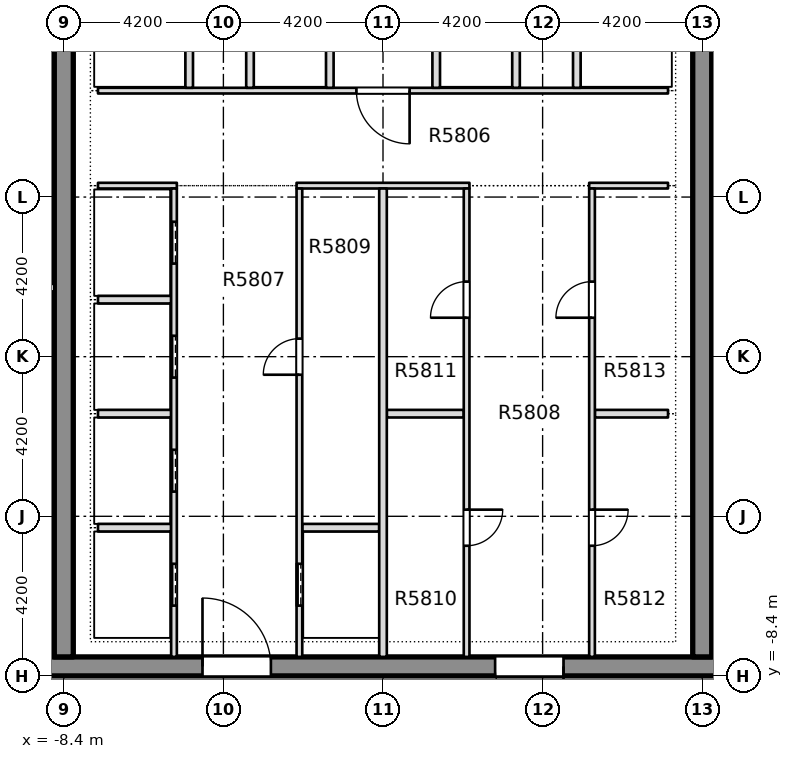
"""IFC4 building model, lengths in metres.
Left out: names, types, materials, properties, quantities, classifications, styles, units other than length and angle.
Written with IfcOpenShell. Run it as: python <this file> out.ifc"""

import sys

from ifc_helpers import new_model, si_unit, direction, frame, frame_2d, origin, place, context, subcontext, project, spatial, rectangle, extrude, element, fill, save


model = new_model("IFC4")
c1 = context("Model", 3, precision=1e-05, world=origin(), true_north=direction((0.0, 1.0)))
c2 = subcontext(c1, "Body", "Model", "MODEL_VIEW")
j1 = project(units=[si_unit("LENGTHUNIT", "METRE"), si_unit("PLANEANGLEUNIT", "RADIAN")], contexts=[c1])
p1 = place(None, origin())
s1 = spatial("IfcSite", under=j1, at=p1, CompositionType="ELEMENT")
p2 = place(p1, origin())
s2 = spatial("IfcBuilding", under=s1, at=p2, CompositionType="ELEMENT")
p3 = place(p2, frame((0.0, 0.0, 223.45)))
s3 = spatial("IfcBuildingStorey", under=s2, at=p3, CompositionType="ELEMENT", Elevation=223.45)
p4 = place(p3, frame((-12.1, -8.15, -0.4), z_axis=(0.0, 0.0, 1.0), x_axis=(1.0, 0.0, 0.0)))
e1 = element("IfcWall", 1, at=p4, inside=s3, PredefinedType="SHEAR", context=c2, shape_type="SweptSolid", body=[
    extrude(rectangle(XDim=24.2, YDim=0.5, at=frame_2d((12.1, 0.0))), origin(), (0.0, 0.0, 1.0), 3.45),
])
p5 = place(p4, frame((7.35, 0.0, 0.4)))
e2 = element("IfcOpeningElement", 2, at=p5, cuts=e1, PredefinedType="OPENING", context=c2, shape_type="SweptSolid", body=[
    extrude(rectangle(XDim=1.8, YDim=2.1, at=frame_2d((0.9, 1.05))), frame((0.0, 0.26, 0.0), z_axis=(0.0, -1.0, 0.0), x_axis=(1.0, 0.0, 0.0)), (0.0, 0.0, 1.0), 0.52),
])
p6 = place(p4, frame((15.05, 0.0, 0.4)))
e3 = element("IfcOpeningElement", 3, at=p6, cuts=e1, PredefinedType="OPENING", context=c2, shape_type="SweptSolid", body=[
    extrude(rectangle(XDim=1.8, YDim=2.1, at=frame_2d((0.9, 1.05))), frame((0.0, 0.26, 0.0), z_axis=(0.0, -1.0, 0.0), x_axis=(1.0, 0.0, 0.0)), (0.0, 0.0, 1.0), 0.52),
])
p7 = place(p3, frame((-8.4, -7.9, -0.4), z_axis=(0.0, 0.0, 1.0), x_axis=(0.0, 1.0, 0.0)))
e4 = element("IfcWall", 4, at=p7, inside=s3, PredefinedType="SHEAR", context=c2, shape_type="SweptSolid", body=[
    extrude(rectangle(XDim=29.15, YDim=0.5, at=frame_2d((14.575, 0.0))), origin(), (0.0, 0.0, 1.0), 3.45),
])
p8 = place(p7, frame((18.8, 0.0, 0.4)))
e5 = element("IfcOpeningElement", 5, at=p8, cuts=e4, PredefinedType="OPENING", context=c2, shape_type="SweptSolid", body=[
    extrude(rectangle(XDim=1.2, YDim=2.1, at=frame_2d((0.6, 1.05))), frame((0.0, 0.26, 0.0), z_axis=(0.0, -1.0, 0.0), x_axis=(1.0, 0.0, 0.0)), (0.0, 0.0, 1.0), 0.52),
])
p9 = place(p3, frame((8.4, -7.9, -0.4), z_axis=(0.0, 0.0, 1.0), x_axis=(0.0, 1.0, 0.0)))
e6 = element("IfcWall", 6, at=p9, inside=s3, PredefinedType="SHEAR", context=c2, shape_type="SweptSolid", body=[
    extrude(rectangle(XDim=29.15, YDim=0.5, at=frame_2d((14.575, 0.0))), origin(), (0.0, 0.0, 1.0), 3.45),
])
p10 = place(p9, frame((18.8, 0.0, 0.4)))
e7 = element("IfcOpeningElement", 7, at=p10, cuts=e6, PredefinedType="OPENING", context=c2, shape_type="SweptSolid", body=[
    extrude(rectangle(XDim=1.2, YDim=2.1, at=frame_2d((0.6, 1.05))), frame((0.0, 0.26, 0.0), z_axis=(0.0, -1.0, 0.0), x_axis=(1.0, 0.0, 0.0)), (0.0, 0.0, 1.0), 0.52),
])
p11 = place(p3, frame((-7.5, -4.5, 0.0), z_axis=(0.0, 0.0, 1.0), x_axis=(1.0, 0.0, 0.0)))
e8 = element("IfcWall", 8, at=p11, inside=s3, PredefinedType="PARTITIONING", context=c2, shape_type="SweptSolid", body=[
    extrude(rectangle(XDim=1.925, YDim=0.2, at=frame_2d((0.962, 0.0))), origin(), (0.0, 0.0, 1.0), 3.05),
])
p12 = place(p3, frame((-2.125, -4.5, 0.0), z_axis=(0.0, 0.0, 1.0), x_axis=(1.0, 0.0, 0.0)))
e9 = element("IfcWall", 9, at=p12, inside=s3, PredefinedType="PARTITIONING", context=c2, shape_type="SweptSolid", body=[
    extrude(rectangle(XDim=2.025, YDim=0.2, at=frame_2d((1.012, 0.0))), origin(), (0.0, 0.0, 1.0), 3.05),
])
p13 = place(p3, frame((-7.5, -1.5, 0.0), z_axis=(0.0, 0.0, 1.0), x_axis=(1.0, 0.0, 0.0)))
e10 = element("IfcWall", 10, at=p13, inside=s3, PredefinedType="PARTITIONING", context=c2, shape_type="SweptSolid", body=[
    extrude(rectangle(XDim=1.925, YDim=0.2, at=frame_2d((0.962, 0.0))), origin(), (0.0, 0.0, 1.0), 3.05),
])
p14 = place(p3, frame((0.1, -1.5, 0.0), z_axis=(0.0, 0.0, 1.0), x_axis=(1.0, 0.0, 0.0)))
e11 = element("IfcWall", 11, at=p14, inside=s3, PredefinedType="PARTITIONING", context=c2, shape_type="SweptSolid", body=[
    extrude(rectangle(XDim=2.025, YDim=0.2, at=frame_2d((1.012, 0.0))), origin(), (0.0, 0.0, 1.0), 3.05),
])
for number, where, z_axis, x_axis in (
    (12, (5.575, -1.5, 0.0), (0.0, 0.0, 1.0), (1.0, 0.0, 0.0)),
    (13, (-7.5, 1.5, 0.0), (0.0, 0.0, 1.0), (1.0, 0.0, 0.0)),
):
    element("IfcWall", number, at=place(p3, frame(where, z_axis=z_axis, x_axis=x_axis)), inside=s3, PredefinedType="PARTITIONING", context=c2, shape_type="SweptSolid", body=[
        extrude(rectangle(XDim=1.925, YDim=0.2, at=frame_2d((0.962, 0.0))), origin(), (0.0, 0.0, 1.0), 3.05),
    ])
p15 = place(p3, frame((-7.5, 4.5, 0.0), z_axis=(0.0, 0.0, 1.0), x_axis=(1.0, 0.0, 0.0)))
e14 = element("IfcWall", 14, at=p15, inside=s3, PredefinedType="PARTITIONING", context=c2, shape_type="SweptSolid", body=[
    extrude(rectangle(XDim=2.075, YDim=0.15, at=frame_2d((1.038, 0.0))), origin(), (0.0, 0.0, 1.0), 3.05),
])
p16 = place(p3, frame((-2.275, 4.5, 0.0), z_axis=(0.0, 0.0, 1.0), x_axis=(1.0, 0.0, 0.0)))
e15 = element("IfcWall", 15, at=p16, inside=s3, PredefinedType="PARTITIONING", context=c2, shape_type="SweptSolid", body=[
    extrude(rectangle(XDim=4.55, YDim=0.15, at=frame_2d((2.275, 0.0))), origin(), (0.0, 0.0, 1.0), 3.05),
])
p17 = place(p3, frame((5.425, 4.5, 0.0), z_axis=(0.0, 0.0, 1.0), x_axis=(1.0, 0.0, 0.0)))
e16 = element("IfcWall", 16, at=p17, inside=s3, PredefinedType="PARTITIONING", context=c2, shape_type="SweptSolid", body=[
    extrude(rectangle(XDim=2.075, YDim=0.15, at=frame_2d((1.038, 0.0))), origin(), (0.0, 0.0, 1.0), 3.05),
])
p18 = place(p3, frame((-7.5, 7.0, 0.0), z_axis=(0.0, 0.0, 1.0), x_axis=(1.0, 0.0, 0.0)))
e17 = element("IfcWall", 17, at=p18, inside=s3, PredefinedType="PARTITIONING", context=c2, shape_type="SweptSolid", body=[
    extrude(rectangle(XDim=15.0, YDim=0.15, at=frame_2d((7.5, 0.0))), origin(), (0.0, 0.0, 1.0), 3.05),
])
p19 = place(p18, frame((6.8, 0.0, 0.0)))
e18 = element("IfcOpeningElement", 18, at=p19, cuts=e17, PredefinedType="OPENING", context=c2, shape_type="SweptSolid", body=[
    extrude(rectangle(XDim=1.4, YDim=2.1, at=frame_2d((0.7, 1.05))), frame((0.0, 0.085, 0.0), z_axis=(0.0, -1.0, 0.0), x_axis=(1.0, 0.0, 0.0)), (0.0, 0.0, 1.0), 0.17),
])
p20 = place(p3, frame((-5.5, -7.899, 0.0), z_axis=(0.0, 0.0, 1.0), x_axis=(0.0, 1.0, 0.0)))
e19 = element("IfcWall", 19, at=p20, inside=s3, PredefinedType="PARTITIONING", context=c2, shape_type="SweptSolid", body=[
    extrude(rectangle(XDim=12.324, YDim=0.15, at=frame_2d((6.162, 0.0))), origin(), (0.0, 0.0, 1.0), 3.05),
])
p21 = place(p20, frame((1.349, 0.0, 0.0)))
e20 = element("IfcOpeningElement", 20, at=p21, cuts=e19, PredefinedType="OPENING", context=c2, shape_type="SweptSolid", body=[
    extrude(rectangle(XDim=1.1, YDim=2.1, at=frame_2d((0.55, 1.05))), frame((0.0, 0.085, 0.0), z_axis=(0.0, -1.0, 0.0), x_axis=(1.0, 0.0, 0.0)), (0.0, 0.0, 1.0), 0.17),
])
p22 = place(p20, frame((4.349, 0.0, 0.0)))
e21 = element("IfcOpeningElement", 21, at=p22, cuts=e19, PredefinedType="OPENING", context=c2, shape_type="SweptSolid", body=[
    extrude(rectangle(XDim=1.1, YDim=2.1, at=frame_2d((0.55, 1.05))), frame((0.0, 0.085, 0.0), z_axis=(0.0, -1.0, 0.0), x_axis=(1.0, 0.0, 0.0)), (0.0, 0.0, 1.0), 0.17),
])
p23 = place(p20, frame((7.349, 0.0, 0.0)))
e22 = element("IfcOpeningElement", 22, at=p23, cuts=e19, PredefinedType="OPENING", context=c2, shape_type="SweptSolid", body=[
    extrude(rectangle(XDim=1.1, YDim=2.1, at=frame_2d((0.55, 1.05))), frame((0.0, 0.085, 0.0), z_axis=(0.0, -1.0, 0.0), x_axis=(1.0, 0.0, 0.0)), (0.0, 0.0, 1.0), 0.17),
])
p24 = place(p20, frame((10.349, 0.0, 0.0)))
e23 = element("IfcOpeningElement", 23, at=p24, cuts=e19, PredefinedType="OPENING", context=c2, shape_type="SweptSolid", body=[
    extrude(rectangle(XDim=1.1, YDim=2.1, at=frame_2d((0.55, 1.05))), frame((0.0, 0.085, 0.0), z_axis=(0.0, -1.0, 0.0), x_axis=(1.0, 0.0, 0.0)), (0.0, 0.0, 1.0), 0.17),
])
p25 = place(p3, frame((-5.1, 7.075, 0.0), z_axis=(0.0, 0.0, 1.0), x_axis=(0.0, 1.0, 0.0)))
e24 = element("IfcWall", 24, at=p25, inside=s3, PredefinedType="PARTITIONING", context=c2, shape_type="SweptSolid", body=[
    extrude(rectangle(XDim=2.725, YDim=0.2, at=frame_2d((1.363, 0.0))), origin(), (0.0, 0.0, 1.0), 3.05),
])
p26 = place(p3, frame((-3.5, 7.075, 0.0), z_axis=(0.0, 0.0, 1.0), x_axis=(0.0, 1.0, 0.0)))
e25 = element("IfcWall", 25, at=p26, inside=s3, PredefinedType="PARTITIONING", context=c2, shape_type="SweptSolid", body=[
    extrude(rectangle(XDim=2.85, YDim=0.2, at=frame_2d((1.425, 0.0))), origin(), (0.0, 0.0, 1.0), 3.05),
])
p27 = place(p3, frame((-2.2, -7.899, 0.0), z_axis=(0.0, 0.0, 1.0), x_axis=(0.0, 1.0, 0.0)))
e26 = element("IfcWall", 26, at=p27, inside=s3, PredefinedType="PARTITIONING", context=c2, shape_type="SweptSolid", body=[
    extrude(rectangle(XDim=12.324, YDim=0.15, at=frame_2d((6.162, 0.0))), origin(), (0.0, 0.0, 1.0), 3.05),
])
p28 = place(p27, frame((1.349, 0.0, 0.0)))
e27 = element("IfcOpeningElement", 27, at=p28, cuts=e26, PredefinedType="OPENING", context=c2, shape_type="SweptSolid", body=[
    extrude(rectangle(XDim=1.1, YDim=2.1, at=frame_2d((0.55, 1.05))), frame((0.0, 0.085, 0.0), z_axis=(0.0, -1.0, 0.0), x_axis=(1.0, 0.0, 0.0)), (0.0, 0.0, 1.0), 0.17),
])
p29 = place(p27, frame((7.424, 0.0, 0.0)))
e28 = element("IfcOpeningElement", 28, at=p29, cuts=e26, PredefinedType="OPENING", context=c2, shape_type="SweptSolid", body=[
    extrude(rectangle(XDim=0.95, YDim=2.1, at=frame_2d((0.475, 1.05))), frame((0.0, 0.085, 0.0), z_axis=(0.0, -1.0, 0.0), x_axis=(1.0, 0.0, 0.0)), (0.0, 0.0, 1.0), 0.17),
])
p30 = place(p3, frame((-1.4, 7.075, 0.0), z_axis=(0.0, 0.0, 1.0), x_axis=(0.0, 1.0, 0.0)))
e29 = element("IfcWall", 29, at=p30, inside=s3, PredefinedType="PARTITIONING", context=c2, shape_type="SweptSolid", body=[
    extrude(rectangle(XDim=2.85, YDim=0.2, at=frame_2d((1.425, 0.0))), origin(), (0.0, 0.0, 1.0), 3.05),
])
p31 = place(p3, frame((0.0, -7.899, 0.0), z_axis=(0.0, 0.0, 1.0), x_axis=(0.0, 1.0, 0.0)))
e30 = element("IfcWall", 30, at=p31, inside=s3, PredefinedType="PARTITIONING", context=c2, shape_type="SweptSolid", body=[
    extrude(rectangle(XDim=12.324, YDim=0.2, at=frame_2d((6.162, 0.0))), origin(), (0.0, 0.0, 1.0), 3.05),
])
p32 = place(p3, frame((1.4, 7.075, 0.0), z_axis=(0.0, 0.0, 1.0), x_axis=(0.0, 1.0, 0.0)))
e31 = element("IfcWall", 31, at=p32, inside=s3, PredefinedType="PARTITIONING", context=c2, shape_type="SweptSolid", body=[
    extrude(rectangle(XDim=2.85, YDim=0.2, at=frame_2d((1.425, 0.0))), origin(), (0.0, 0.0, 1.0), 3.05),
])
p33 = place(p3, frame((2.2, -7.899, 0.0), z_axis=(0.0, 0.0, 1.0), x_axis=(0.0, 1.0, 0.0)))
e32 = element("IfcWall", 32, at=p33, inside=s3, PredefinedType="PARTITIONING", context=c2, shape_type="SweptSolid", body=[
    extrude(rectangle(XDim=12.324, YDim=0.15, at=frame_2d((6.162, 0.0))), origin(), (0.0, 0.0, 1.0), 3.05),
])
p34 = place(p33, frame((2.924, 0.0, 0.0)))
e33 = element("IfcOpeningElement", 33, at=p34, cuts=e32, PredefinedType="OPENING", context=c2, shape_type="SweptSolid", body=[
    extrude(rectangle(XDim=0.95, YDim=2.1, at=frame_2d((0.475, 1.05))), frame((0.0, 0.085, 0.0), z_axis=(0.0, -1.0, 0.0), x_axis=(1.0, 0.0, 0.0)), (0.0, 0.0, 1.0), 0.17),
])
p35 = place(p33, frame((8.924, 0.0, 0.0)))
e34 = element("IfcOpeningElement", 34, at=p35, cuts=e32, PredefinedType="OPENING", context=c2, shape_type="SweptSolid", body=[
    extrude(rectangle(XDim=0.95, YDim=2.1, at=frame_2d((0.475, 1.05))), frame((0.0, 0.085, 0.0), z_axis=(0.0, -1.0, 0.0), x_axis=(1.0, 0.0, 0.0)), (0.0, 0.0, 1.0), 0.17),
])
p36 = place(p3, frame((3.5, 7.075, 0.0), z_axis=(0.0, 0.0, 1.0), x_axis=(0.0, 1.0, 0.0)))
e35 = element("IfcWall", 35, at=p36, inside=s3, PredefinedType="PARTITIONING", context=c2, shape_type="SweptSolid", body=[
    extrude(rectangle(XDim=2.85, YDim=0.2, at=frame_2d((1.425, 0.0))), origin(), (0.0, 0.0, 1.0), 3.05),
])
p37 = place(p3, frame((5.1, 7.075, 0.0), z_axis=(0.0, 0.0, 1.0), x_axis=(0.0, 1.0, 0.0)))
e36 = element("IfcWall", 36, at=p37, inside=s3, PredefinedType="PARTITIONING", context=c2, shape_type="SweptSolid", body=[
    extrude(rectangle(XDim=2.725, YDim=0.2, at=frame_2d((1.363, 0.0))), origin(), (0.0, 0.0, 1.0), 3.05),
])
p38 = place(p3, frame((5.5, -7.899, 0.0), z_axis=(0.0, 0.0, 1.0), x_axis=(0.0, 1.0, 0.0)))
e37 = element("IfcWall", 37, at=p38, inside=s3, PredefinedType="PARTITIONING", context=c2, shape_type="SweptSolid", body=[
    extrude(rectangle(XDim=12.324, YDim=0.15, at=frame_2d((6.162, 0.0))), origin(), (0.0, 0.0, 1.0), 3.05),
])
p39 = place(p38, frame((2.924, 0.0, 0.0)))
e38 = element("IfcOpeningElement", 38, at=p39, cuts=e37, PredefinedType="OPENING", context=c2, shape_type="SweptSolid", body=[
    extrude(rectangle(XDim=0.95, YDim=2.1, at=frame_2d((0.475, 1.05))), frame((0.0, 0.085, 0.0), z_axis=(0.0, -1.0, 0.0), x_axis=(1.0, 0.0, 0.0)), (0.0, 0.0, 1.0), 0.17),
])
p40 = place(p38, frame((8.924, 0.0, 0.0)))
e39 = element("IfcOpeningElement", 39, at=p40, cuts=e37, PredefinedType="OPENING", context=c2, shape_type="SweptSolid", body=[
    extrude(rectangle(XDim=0.95, YDim=2.1, at=frame_2d((0.475, 1.05))), frame((0.0, 0.085, 0.0), z_axis=(0.0, -1.0, 0.0), x_axis=(1.0, 0.0, 0.0)), (0.0, 0.0, 1.0), 0.17),
])
p41 = place(p3, frame((-12.099, 1.816, 0.0), z_axis=(0.0, 0.0, 1.0), x_axis=(1.0, 0.0, 0.0)))
e40 = element("IfcWall", 40, at=p41, inside=s3, PredefinedType="PARTITIONING", context=c2, shape_type="SweptSolid", body=[
    extrude(rectangle(XDim=3.448, YDim=0.2, at=frame_2d((1.724, 0.0))), origin(), (0.0, 0.0, 1.0), 3.05),
])
for number, where, z_axis, x_axis in (
    (41, (8.651, -0.125, 0.0), (0.0, 0.0, 1.0), (1.0, 0.0, 0.0)),
    (42, (8.651, 4.054, 0.0), (0.0, 0.0, 1.0), (1.0, 0.0, 0.0)),
):
    element("IfcWall", number, at=place(p3, frame(where, z_axis=z_axis, x_axis=x_axis)), inside=s3, PredefinedType="PARTITIONING", context=c2, shape_type="SweptSolid", body=[
        extrude(rectangle(XDim=3.448, YDim=0.1, at=frame_2d((1.724, 0.0))), origin(), (0.0, 0.0, 1.0), 3.05),
    ])
p42 = place(p21, origin())
e43 = element("IfcDoor", 43, at=p42, inside=s3, OperationType="SLIDING_TO_LEFT", PredefinedType="DOOR", context=c2, shape_type="SweptSolid", body=[
    extrude(rectangle(XDim=1.1, YDim=2.1, at=frame_2d((0.55, 1.05))), frame((0.0, 0.025, 0.0), z_axis=(0.0, -1.0, 0.0), x_axis=(1.0, 0.0, 0.0)), (0.0, 0.0, 1.0), 0.05),
])
fill(e20, e43)
p43 = place(p22, origin())
e44 = element("IfcDoor", 44, at=p43, inside=s3, OperationType="SLIDING_TO_LEFT", PredefinedType="DOOR", context=c2, shape_type="SweptSolid", body=[
    extrude(rectangle(XDim=1.1, YDim=2.1, at=frame_2d((0.55, 1.05))), frame((0.0, 0.025, 0.0), z_axis=(0.0, -1.0, 0.0), x_axis=(1.0, 0.0, 0.0)), (0.0, 0.0, 1.0), 0.05),
])
fill(e21, e44)
p44 = place(p23, origin())
e45 = element("IfcDoor", 45, at=p44, inside=s3, OperationType="SLIDING_TO_LEFT", PredefinedType="DOOR", context=c2, shape_type="SweptSolid", body=[
    extrude(rectangle(XDim=1.1, YDim=2.1, at=frame_2d((0.55, 1.05))), frame((0.0, 0.025, 0.0), z_axis=(0.0, -1.0, 0.0), x_axis=(1.0, 0.0, 0.0)), (0.0, 0.0, 1.0), 0.05),
])
fill(e22, e45)
p45 = place(p24, origin())
e46 = element("IfcDoor", 46, at=p45, inside=s3, OperationType="SLIDING_TO_LEFT", PredefinedType="DOOR", context=c2, shape_type="SweptSolid", body=[
    extrude(rectangle(XDim=1.1, YDim=2.1, at=frame_2d((0.55, 1.05))), frame((0.0, 0.025, 0.0), z_axis=(0.0, -1.0, 0.0), x_axis=(1.0, 0.0, 0.0)), (0.0, 0.0, 1.0), 0.05),
])
fill(e23, e46)
p46 = place(p28, origin())
e47 = element("IfcDoor", 47, at=p46, inside=s3, OperationType="SLIDING_TO_LEFT", PredefinedType="DOOR", context=c2, shape_type="SweptSolid", body=[
    extrude(rectangle(XDim=1.1, YDim=2.1, at=frame_2d((0.55, 1.05))), frame((0.0, 0.025, 0.0), z_axis=(0.0, -1.0, 0.0), x_axis=(1.0, 0.0, 0.0)), (0.0, 0.0, 1.0), 0.05),
])
fill(e27, e47)
p47 = place(p29, origin())
e48 = element("IfcDoor", 48, at=p47, inside=s3, OperationType="SINGLE_SWING_RIGHT", PredefinedType="DOOR", context=c2, shape_type="SweptSolid", body=[
    extrude(rectangle(XDim=0.95, YDim=2.1, at=frame_2d((0.475, 1.05))), frame((0.0, 0.025, 0.0), z_axis=(0.0, -1.0, 0.0), x_axis=(1.0, 0.0, 0.0)), (0.0, 0.0, 1.0), 0.05),
])
fill(e28, e48)
p48 = place(p34, origin())
e49 = element("IfcDoor", 49, at=p48, inside=s3, OperationType="SINGLE_SWING_RIGHT", PredefinedType="DOOR", context=c2, shape_type="SweptSolid", body=[
    extrude(rectangle(XDim=0.95, YDim=2.1, at=frame_2d((0.475, 1.05))), frame((0.0, 0.025, 0.0), z_axis=(0.0, -1.0, 0.0), x_axis=(1.0, 0.0, 0.0)), (0.0, 0.0, 1.0), 0.05),
])
fill(e33, e49)
p49 = place(p35, origin())
e50 = element("IfcDoor", 50, at=p49, inside=s3, OperationType="SINGLE_SWING_RIGHT", PredefinedType="DOOR", context=c2, shape_type="SweptSolid", body=[
    extrude(rectangle(XDim=0.95, YDim=2.1, at=frame_2d((0.475, 1.05))), frame((0.0, 0.025, 0.0), z_axis=(0.0, -1.0, 0.0), x_axis=(1.0, 0.0, 0.0)), (0.0, 0.0, 1.0), 0.05),
])
fill(e34, e50)
p50 = place(p39, origin())
e51 = element("IfcDoor", 51, at=p50, inside=s3, OperationType="SINGLE_SWING_LEFT", PredefinedType="DOOR", context=c2, shape_type="SweptSolid", body=[
    extrude(rectangle(XDim=0.95, YDim=2.1, at=frame_2d((0.475, 1.05))), frame((0.0, 0.025, 0.0), z_axis=(0.0, -1.0, 0.0), x_axis=(1.0, 0.0, 0.0)), (0.0, 0.0, 1.0), 0.05),
])
fill(e38, e51)
p51 = place(p40, origin())
e52 = element("IfcDoor", 52, at=p51, inside=s3, OperationType="SINGLE_SWING_LEFT", PredefinedType="DOOR", context=c2, shape_type="SweptSolid", body=[
    extrude(rectangle(XDim=0.95, YDim=2.1, at=frame_2d((0.475, 1.05))), frame((0.0, 0.025, 0.0), z_axis=(0.0, -1.0, 0.0), x_axis=(1.0, 0.0, 0.0)), (0.0, 0.0, 1.0), 0.05),
])
fill(e39, e52)
p52 = place(p19, origin())
e53 = element("IfcDoor", 53, at=p52, inside=s3, OperationType="SINGLE_SWING_RIGHT", PredefinedType="DOOR", context=c2, shape_type="SweptSolid", body=[
    extrude(rectangle(XDim=1.4, YDim=2.1, at=frame_2d((0.7, 1.05))), frame((0.0, 0.025, 0.0), z_axis=(0.0, -1.0, 0.0), x_axis=(1.0, 0.0, 0.0)), (0.0, 0.0, 1.0), 0.05),
])
fill(e18, e53)
p53 = place(p5, origin())
e54 = element("IfcDoor", 54, at=p53, inside=s3, OperationType="SINGLE_SWING_LEFT", PredefinedType="DOOR", context=c2, shape_type="SweptSolid", body=[
    extrude(rectangle(XDim=1.8, YDim=2.1, at=frame_2d((0.9, 1.05))), frame((0.0, 0.025, 0.0), z_axis=(0.0, -1.0, 0.0), x_axis=(1.0, 0.0, 0.0)), (0.0, 0.0, 1.0), 0.05),
])
fill(e2, e54)
p54 = place(p6, origin())
e55 = element("IfcDoor", 55, at=p54, inside=s3, OperationType="SINGLE_SWING_LEFT", PredefinedType="DOOR", context=c2, shape_type="SweptSolid", body=[
    extrude(rectangle(XDim=1.8, YDim=2.1, at=frame_2d((0.9, 1.05))), frame((0.0, 0.025, 0.0), z_axis=(0.0, -1.0, 0.0), x_axis=(1.0, 0.0, 0.0)), (0.0, 0.0, 1.0), 0.05),
])
fill(e3, e55)
save(model, sys.argv[1])
